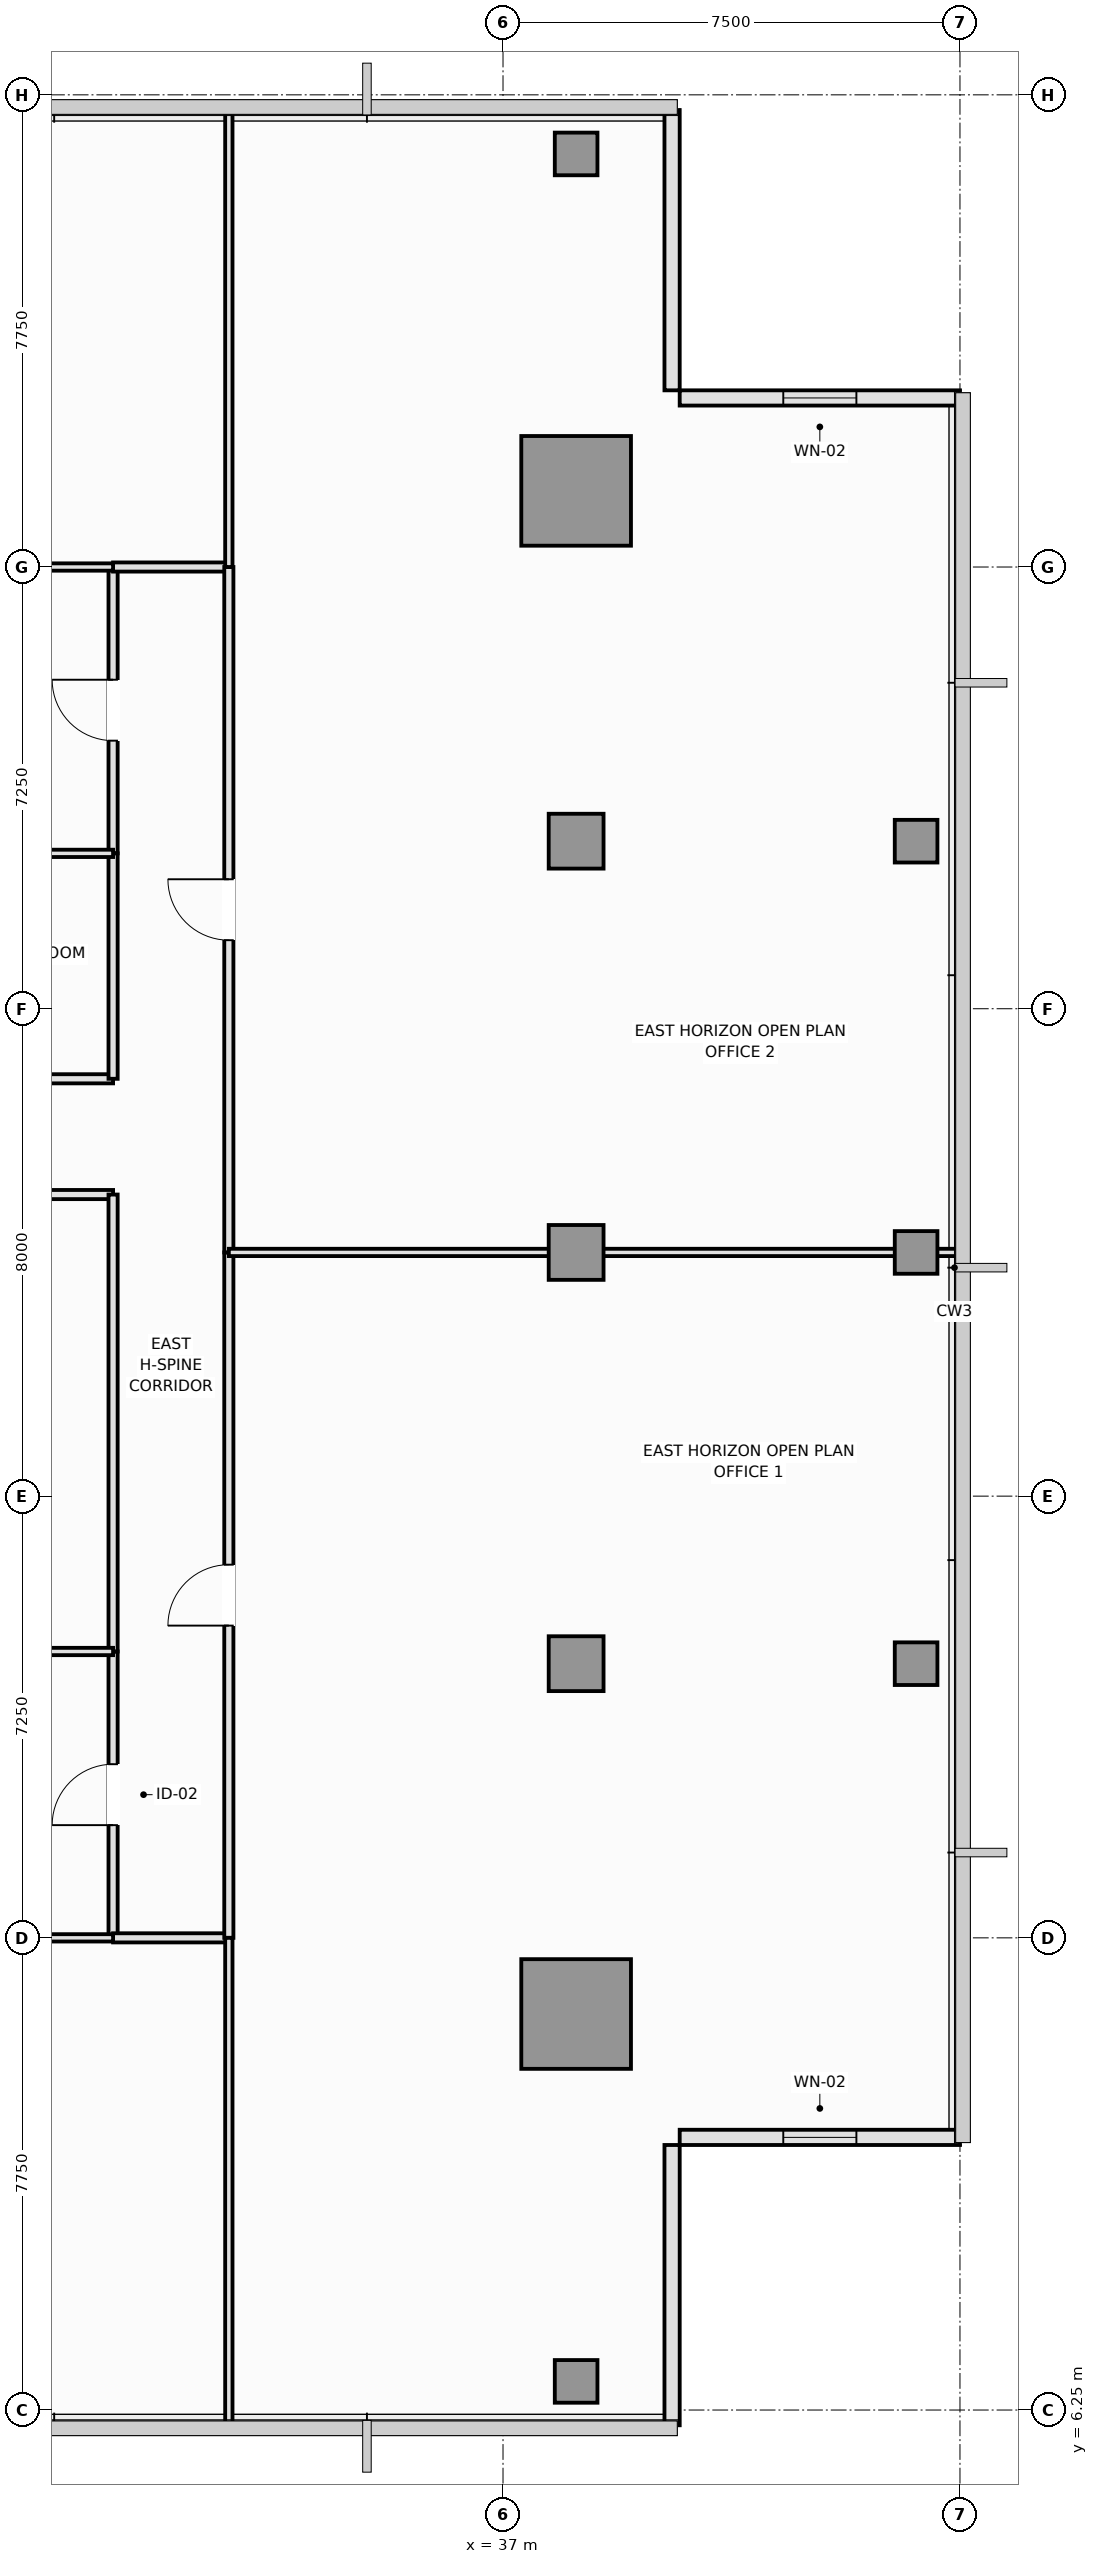
"""IFC4 building model, lengths in metres.
Left out: names, types, materials, properties, quantities, classifications, styles, units other than length and angle.
Written with IfcOpenShell. Run it as: python <this file> out.ifc"""

import sys

from ifc_helpers import new_model, si_unit, direction, frame, frame_2d, origin, origin_2d, place, context, subcontext, project, spatial, rectangle, extrude, element, fill, save


model = new_model("IFC4")
c1 = context("Model", 3, precision=1e-05, world=origin(), true_north=direction((0.0, 1.0)))
c2 = subcontext(c1, "Body", "Model", "MODEL_VIEW")
j1 = project(units=[si_unit("LENGTHUNIT", "METRE"), si_unit("PLANEANGLEUNIT", "RADIAN")], contexts=[c1])
p1 = place(None, origin())
s1 = spatial("IfcSite", under=j1, at=p1, CompositionType="ELEMENT")
p2 = place(p1, origin())
s2 = spatial("IfcBuilding", under=s1, at=p2, CompositionType="ELEMENT")
p3 = place(p2, frame((0.0, 0.0, 259.9)))
s3 = spatial("IfcBuildingStorey", under=s2, at=p3, CompositionType="ELEMENT", Elevation=259.9)
for number, where, z_axis, x_axis in (
    (1, (38.2, 12.75, 0.0), (0.0, 0.0, 1.0), (1.0, 0.0, 0.0)),
    (2, (38.2, 37.75, 0.0), (0.0, 0.0, 1.0), (1.0, 0.0, 0.0)),
):
    element("IfcColumn", number, at=place(p3, frame(where, z_axis=z_axis, x_axis=x_axis)), inside=s3, PredefinedType="COLUMN", context=c2, shape_type="SweptSolid", body=[
        extrude(rectangle(XDim=1.8, YDim=1.8, at=origin_2d()), origin(), (0.0, 0.0, 1.0), 3.55),
    ])
for number, where, z_axis, x_axis in (
    (3, (38.2, 18.5, 0.0), (0.0, 0.0, 1.0), (1.0, 0.0, 0.0)),
    (4, (38.2, 25.25, 0.0), (0.0, 0.0, 1.0), (1.0, 0.0, 0.0)),
    (5, (38.2, 32.0, 0.0), (0.0, 0.0, 1.0), (1.0, 0.0, 0.0)),
):
    element("IfcColumn", number, at=place(p3, frame(where, z_axis=z_axis, x_axis=x_axis)), inside=s3, PredefinedType="COLUMN", context=c2, shape_type="SweptSolid", body=[
        extrude(rectangle(XDim=0.9, YDim=0.9, at=origin_2d()), origin(), (0.0, 0.0, 1.0), 3.55),
    ])
for number, where, z_axis, x_axis in (
    (6, (43.78, 18.5, 0.0), (0.0, 0.0, 1.0), (1.0, 0.0, 0.0)),
    (7, (43.78, 25.25, 0.0), (0.0, 0.0, 1.0), (1.0, 0.0, 0.0)),
    (8, (43.78, 32.0, 0.0), (0.0, 0.0, 1.0), (1.0, 0.0, 0.0)),
    (9, (38.2, 6.72, 0.0), (0.0, 0.0, 1.0), (1.0, 0.0, 0.0)),
    (10, (38.2, 43.28, 0.0), (0.0, 0.0, 1.0), (1.0, 0.0, 0.0)),
):
    element("IfcColumn", number, at=place(p3, frame(where, z_axis=z_axis, x_axis=x_axis)), inside=s3, PredefinedType="COLUMN", context=c2, shape_type="SweptSolid", body=[
        extrude(rectangle(XDim=0.7, YDim=0.7, at=origin_2d()), origin(), (0.0, 0.0, 1.0), 3.55),
    ])
p4 = place(p3, frame((39.775, 6.0, 0.0), z_axis=(0.0, 0.0, 1.0), x_axis=(0.0, 1.0, 0.0)))
e11 = element("IfcWall", 11, at=p4, inside=s3, PredefinedType="SOLIDWALL", context=c2, shape_type="SweptSolid", body=[
    extrude(rectangle(XDim=4.6, YDim=0.25, at=frame_2d((2.3, 0.0))), origin(), (0.0, 0.0, 1.0), 3.39),
])
p5 = place(p3, frame((39.9, 10.725, 0.0), z_axis=(0.0, 0.0, 1.0), x_axis=(1.0, 0.0, 0.0)))
e12 = element("IfcWall", 12, at=p5, inside=s3, PredefinedType="SOLIDWALL", context=c2, shape_type="SweptSolid", body=[
    extrude(rectangle(XDim=4.6, YDim=0.25, at=frame_2d((2.3, 0.0))), origin(), (0.0, 0.0, 1.0), 3.39),
])
p6 = place(p5, frame((1.7, 0.0, 0.9)))
e13 = element("IfcOpeningElement", 13, at=p6, cuts=e12, PredefinedType="OPENING", context=c2, shape_type="SweptSolid", body=[
    extrude(rectangle(XDim=1.2, YDim=1.8, at=frame_2d((0.6, 0.9))), frame((0.0, 0.135, 0.0), z_axis=(0.0, -1.0, 0.0), x_axis=(1.0, 0.0, 0.0)), (0.0, 0.0, 1.0), 0.27),
])
p7 = place(p3, frame((44.5, 39.275, 0.0), z_axis=(0.0, 0.0, 1.0), x_axis=(-1.0, 0.0, 0.0)))
e14 = element("IfcWall", 14, at=p7, inside=s3, PredefinedType="SOLIDWALL", context=c2, shape_type="SweptSolid", body=[
    extrude(rectangle(XDim=4.6, YDim=0.25, at=frame_2d((2.3, 0.0))), origin(), (0.0, 0.0, 1.0), 3.39),
])
p8 = place(p7, frame((1.7, 0.0, 0.9)))
e15 = element("IfcOpeningElement", 15, at=p8, cuts=e14, PredefinedType="OPENING", context=c2, shape_type="SweptSolid", body=[
    extrude(rectangle(XDim=1.2, YDim=1.8, at=frame_2d((0.6, 0.9))), frame((0.0, 0.135, 0.0), z_axis=(0.0, -1.0, 0.0), x_axis=(1.0, 0.0, 0.0)), (0.0, 0.0, 1.0), 0.27),
])
p9 = place(p3, frame((39.775, 39.4, 0.0), z_axis=(0.0, 0.0, 1.0), x_axis=(0.0, 1.0, 0.0)))
e16 = element("IfcWall", 16, at=p9, inside=s3, PredefinedType="SOLIDWALL", context=c2, shape_type="SweptSolid", body=[
    extrude(rectangle(XDim=4.6, YDim=0.25, at=frame_2d((2.3, 0.0))), origin(), (0.0, 0.0, 1.0), 3.39),
])
p10 = place(p3, frame((19.9, 26.2, 0.0), z_axis=(0.0, 0.0, 1.0), x_axis=(1.0, 0.0, 0.0)))
e17 = element("IfcWall", 17, at=p10, inside=s3, PredefinedType="PARTITIONING", context=c2, shape_type="SweptSolid", body=[
    extrude(rectangle(XDim=10.7, YDim=0.15, at=frame_2d((5.35, 0.0))), origin(), (0.0, 0.0, 1.0), 3.39),
])
p11 = place(p10, frame((4.85, 0.0, 0.0)))
e18 = element("IfcOpeningElement", 18, at=p11, cuts=e17, PredefinedType="OPENING", context=c2, shape_type="SweptSolid", body=[
    extrude(rectangle(XDim=1.0, YDim=2.15, at=frame_2d((0.5, 1.075))), frame((0.0, 0.085, 0.0), z_axis=(0.0, -1.0, 0.0), x_axis=(1.0, 0.0, 0.0)), (0.0, 0.0, 1.0), 0.17),
])
p12 = place(p3, frame((19.9, 28.1, 0.0), z_axis=(0.0, 0.0, 1.0), x_axis=(1.0, 0.0, 0.0)))
e19 = element("IfcWall", 19, at=p12, inside=s3, PredefinedType="PARTITIONING", context=c2, shape_type="SweptSolid", body=[
    extrude(rectangle(XDim=10.7, YDim=0.15, at=frame_2d((5.35, 0.0))), origin(), (0.0, 0.0, 1.0), 3.39),
])
p13 = place(p12, frame((4.85, 0.0, 0.0)))
e20 = element("IfcOpeningElement", 20, at=p13, cuts=e19, PredefinedType="OPENING", context=c2, shape_type="SweptSolid", body=[
    extrude(rectangle(XDim=1.0, YDim=2.15, at=frame_2d((0.5, 1.075))), frame((0.0, 0.085, 0.0), z_axis=(0.0, -1.0, 0.0), x_axis=(1.0, 0.0, 0.0)), (0.0, 0.0, 1.0), 0.17),
])
p14 = place(p3, frame((30.6, 14.0, 0.0), z_axis=(0.0, 0.0, 1.0), x_axis=(0.0, 1.0, 0.0)))
e21 = element("IfcWall", 21, at=p14, inside=s3, PredefinedType="PARTITIONING", context=c2, shape_type="SweptSolid", body=[
    extrude(rectangle(XDim=4.7, YDim=0.15, at=frame_2d((2.35, 0.0))), origin(), (0.0, 0.0, 1.0), 3.39),
])
p15 = place(p14, frame((1.85, 0.0, 0.0)))
e22 = element("IfcOpeningElement", 22, at=p15, cuts=e21, PredefinedType="OPENING", context=c2, shape_type="SweptSolid", body=[
    extrude(rectangle(XDim=1.0, YDim=2.15, at=frame_2d((0.5, 1.075))), frame((0.0, 0.085, 0.0), z_axis=(0.0, -1.0, 0.0), x_axis=(1.0, 0.0, 0.0)), (0.0, 0.0, 1.0), 0.17),
])
p16 = place(p3, frame((30.6, 31.8, 0.0), z_axis=(0.0, 0.0, 1.0), x_axis=(0.0, 1.0, 0.0)))
e23 = element("IfcWall", 23, at=p16, inside=s3, PredefinedType="PARTITIONING", context=c2, shape_type="SweptSolid", body=[
    extrude(rectangle(XDim=4.7, YDim=0.15, at=frame_2d((2.35, 0.0))), origin(), (0.0, 0.0, 1.0), 3.39),
])
p17 = place(p16, frame((1.85, 0.0, 0.0)))
e24 = element("IfcOpeningElement", 24, at=p17, cuts=e23, PredefinedType="OPENING", context=c2, shape_type="SweptSolid", body=[
    extrude(rectangle(XDim=1.0, YDim=2.15, at=frame_2d((0.5, 1.075))), frame((0.0, 0.085, 0.0), z_axis=(0.0, -1.0, 0.0), x_axis=(1.0, 0.0, 0.0)), (0.0, 0.0, 1.0), 0.17),
])
p18 = place(p3, frame((30.6, 18.7, 0.0), z_axis=(0.0, 0.0, 1.0), x_axis=(0.0, 1.0, 0.0)))
e25 = element("IfcWall", 25, at=p18, inside=s3, PredefinedType="PARTITIONING", context=c2, shape_type="SweptSolid", body=[
    extrude(rectangle(XDim=7.5, YDim=0.15, at=frame_2d((3.75, 0.0))), origin(), (0.0, 0.0, 1.0), 3.39),
])
p19 = place(p3, frame((30.6, 28.1, 0.0), z_axis=(0.0, 0.0, 1.0), x_axis=(0.0, 1.0, 0.0)))
e26 = element("IfcWall", 26, at=p19, inside=s3, PredefinedType="PARTITIONING", context=c2, shape_type="SweptSolid", body=[
    extrude(rectangle(XDim=3.7, YDim=0.15, at=frame_2d((1.85, 0.0))), origin(), (0.0, 0.0, 1.0), 3.39),
])
for number, where, z_axis, x_axis in (
    (27, (30.6, 14.0, 0.0), (0.0, 0.0, 1.0), (1.0, 0.0, 0.0)),
    (28, (30.6, 36.5, 0.0), (0.0, 0.0, 1.0), (1.0, 0.0, 0.0)),
):
    element("IfcWall", number, at=place(p3, frame(where, z_axis=z_axis, x_axis=x_axis)), inside=s3, PredefinedType="PARTITIONING", context=c2, shape_type="SweptSolid", body=[
        extrude(rectangle(XDim=1.9, YDim=0.15, at=frame_2d((0.95, 0.0))), origin(), (0.0, 0.0, 1.0), 3.39),
    ])
p20 = place(p3, frame((32.5, 14.0, 0.0), z_axis=(0.0, 0.0, 1.0), x_axis=(0.0, 1.0, 0.0)))
e29 = element("IfcWall", 29, at=p20, inside=s3, PredefinedType="PARTITIONING", context=c2, shape_type="SweptSolid", body=[
    extrude(rectangle(XDim=11.25, YDim=0.15, at=frame_2d((5.625, 0.0))), origin(), (0.0, 0.0, 1.0), 3.12),
])
p21 = place(p20, frame((5.125, 0.0, 0.0)))
e30 = element("IfcOpeningElement", 30, at=p21, cuts=e29, PredefinedType="OPENING", context=c2, shape_type="SweptSolid", body=[
    extrude(rectangle(XDim=1.0, YDim=2.15, at=frame_2d((0.5, 1.075))), frame((0.0, 0.085, 0.0), z_axis=(0.0, -1.0, 0.0), x_axis=(1.0, 0.0, 0.0)), (0.0, 0.0, 1.0), 0.17),
])
p22 = place(p3, frame((32.5, 25.25, 0.0), z_axis=(0.0, 0.0, 1.0), x_axis=(0.0, 1.0, 0.0)))
e31 = element("IfcWall", 31, at=p22, inside=s3, PredefinedType="PARTITIONING", context=c2, shape_type="SweptSolid", body=[
    extrude(rectangle(XDim=11.25, YDim=0.15, at=frame_2d((5.625, 0.0))), origin(), (0.0, 0.0, 1.0), 3.12),
])
p23 = place(p22, frame((5.125, 0.0, 0.0)))
e32 = element("IfcOpeningElement", 32, at=p23, cuts=e31, PredefinedType="OPENING", context=c2, shape_type="SweptSolid", body=[
    extrude(rectangle(XDim=1.0, YDim=2.15, at=frame_2d((0.5, 1.075))), frame((0.0, 0.085, 0.0), z_axis=(0.0, -1.0, 0.0), x_axis=(1.0, 0.0, 0.0)), (0.0, 0.0, 1.0), 0.17),
])
for number, where, z_axis, x_axis in (
    (33, (23.5, 18.7, 0.0), (0.0, 0.0, 1.0), (1.0, 0.0, 0.0)),
    (34, (23.5, 14.0, 0.0), (0.0, 0.0, 1.0), (1.0, 0.0, 0.0)),
    (35, (23.5, 31.8, 0.0), (0.0, 0.0, 1.0), (1.0, 0.0, 0.0)),
    (36, (23.5, 36.5, 0.0), (0.0, 0.0, 1.0), (1.0, 0.0, 0.0)),
):
    element("IfcWall", number, at=place(p3, frame(where, z_axis=z_axis, x_axis=x_axis)), inside=s3, PredefinedType="PARTITIONING", context=c2, shape_type="SweptSolid", body=[
        extrude(rectangle(XDim=7.1, YDim=0.12, at=frame_2d((3.55, 0.0))), origin(), (0.0, 0.0, 1.0), 3.39),
    ])
p24 = place(p3, frame((32.5, 6.01, 0.0), z_axis=(0.0, 0.0, 1.0), x_axis=(0.0, 1.0, 0.0)))
e37 = element("IfcWall", 37, at=p24, inside=s3, PredefinedType="PARTITIONING", context=c2, shape_type="SweptSolid", body=[
    extrude(rectangle(XDim=7.99, YDim=0.12, at=frame_2d((3.995, 0.0))), origin(), (0.0, 0.0, 1.0), 3.12),
])
p25 = place(p3, frame((32.5, 36.5, 0.0), z_axis=(0.0, 0.0, 1.0), x_axis=(0.0, 1.0, 0.0)))
e38 = element("IfcWall", 38, at=p25, inside=s3, PredefinedType="PARTITIONING", context=c2, shape_type="SweptSolid", body=[
    extrude(rectangle(XDim=7.49, YDim=0.12, at=frame_2d((3.745, 0.0))), origin(), (0.0, 0.0, 1.0), 3.12),
])
p26 = place(p3, frame((32.5, 25.25, 0.0), z_axis=(0.0, 0.0, 1.0), x_axis=(1.0, 0.0, 0.0)))
e39 = element("IfcWall", 39, at=p26, inside=s3, PredefinedType="PARTITIONING", context=c2, shape_type="SweptSolid", body=[
    extrude(rectangle(XDim=11.99, YDim=0.12, at=frame_2d((5.995, 0.0))), origin(), (0.0, 0.0, 1.0), 2.94),
])
p27 = place(p6, origin())
e40 = element("IfcWindow", 40, at=p27, inside=s3, PartitioningType="SINGLE_PANEL", PredefinedType="WINDOW", context=c2, shape_type="SweptSolid", body=[
    extrude(rectangle(XDim=1.2, YDim=1.8, at=frame_2d((0.6, 0.9))), frame((0.0, 0.03, 0.0), z_axis=(0.0, -1.0, 0.0), x_axis=(1.0, 0.0, 0.0)), (0.0, 0.0, 1.0), 0.06),
])
fill(e13, e40)
p28 = place(p8, origin())
e41 = element("IfcWindow", 41, at=p28, inside=s3, PartitioningType="SINGLE_PANEL", PredefinedType="WINDOW", context=c2, shape_type="SweptSolid", body=[
    extrude(rectangle(XDim=1.2, YDim=1.8, at=frame_2d((0.6, 0.9))), frame((0.0, 0.03, 0.0), z_axis=(0.0, -1.0, 0.0), x_axis=(1.0, 0.0, 0.0)), (0.0, 0.0, 1.0), 0.06),
])
fill(e15, e41)
p29 = place(p15, origin())
e42 = element("IfcDoor", 42, at=p29, inside=s3, OperationType="SINGLE_SWING_LEFT", PredefinedType="DOOR", context=c2, shape_type="SweptSolid", body=[
    extrude(rectangle(XDim=1.0, YDim=2.15, at=frame_2d((0.5, 1.075))), frame((0.0, 0.025, 0.0), z_axis=(0.0, -1.0, 0.0), x_axis=(1.0, 0.0, 0.0)), (0.0, 0.0, 1.0), 0.05),
])
fill(e22, e42)
p30 = place(p17, origin())
e43 = element("IfcDoor", 43, at=p30, inside=s3, OperationType="SINGLE_SWING_RIGHT", PredefinedType="DOOR", context=c2, shape_type="SweptSolid", body=[
    extrude(rectangle(XDim=1.0, YDim=2.15, at=frame_2d((0.5, 1.075))), frame((0.0, 0.025, 0.0), z_axis=(0.0, -1.0, 0.0), x_axis=(1.0, 0.0, 0.0)), (0.0, 0.0, 1.0), 0.05),
])
fill(e24, e43)
p31 = place(p21, origin())
e44 = element("IfcDoor", 44, at=p31, inside=s3, OperationType="SINGLE_SWING_LEFT", PredefinedType="DOOR", context=c2, shape_type="SweptSolid", body=[
    extrude(rectangle(XDim=1.0, YDim=2.15, at=frame_2d((0.5, 1.075))), frame((0.0, 0.025, 0.0), z_axis=(0.0, -1.0, 0.0), x_axis=(1.0, 0.0, 0.0)), (0.0, 0.0, 1.0), 0.05),
])
fill(e30, e44)
p32 = place(p23, origin())
e45 = element("IfcDoor", 45, at=p32, inside=s3, OperationType="SINGLE_SWING_RIGHT", PredefinedType="DOOR", context=c2, shape_type="SweptSolid", body=[
    extrude(rectangle(XDim=1.0, YDim=2.15, at=frame_2d((0.5, 1.075))), frame((0.0, 0.025, 0.0), z_axis=(0.0, -1.0, 0.0), x_axis=(1.0, 0.0, 0.0)), (0.0, 0.0, 1.0), 0.05),
])
fill(e32, e45)
save(model, sys.argv[1])
